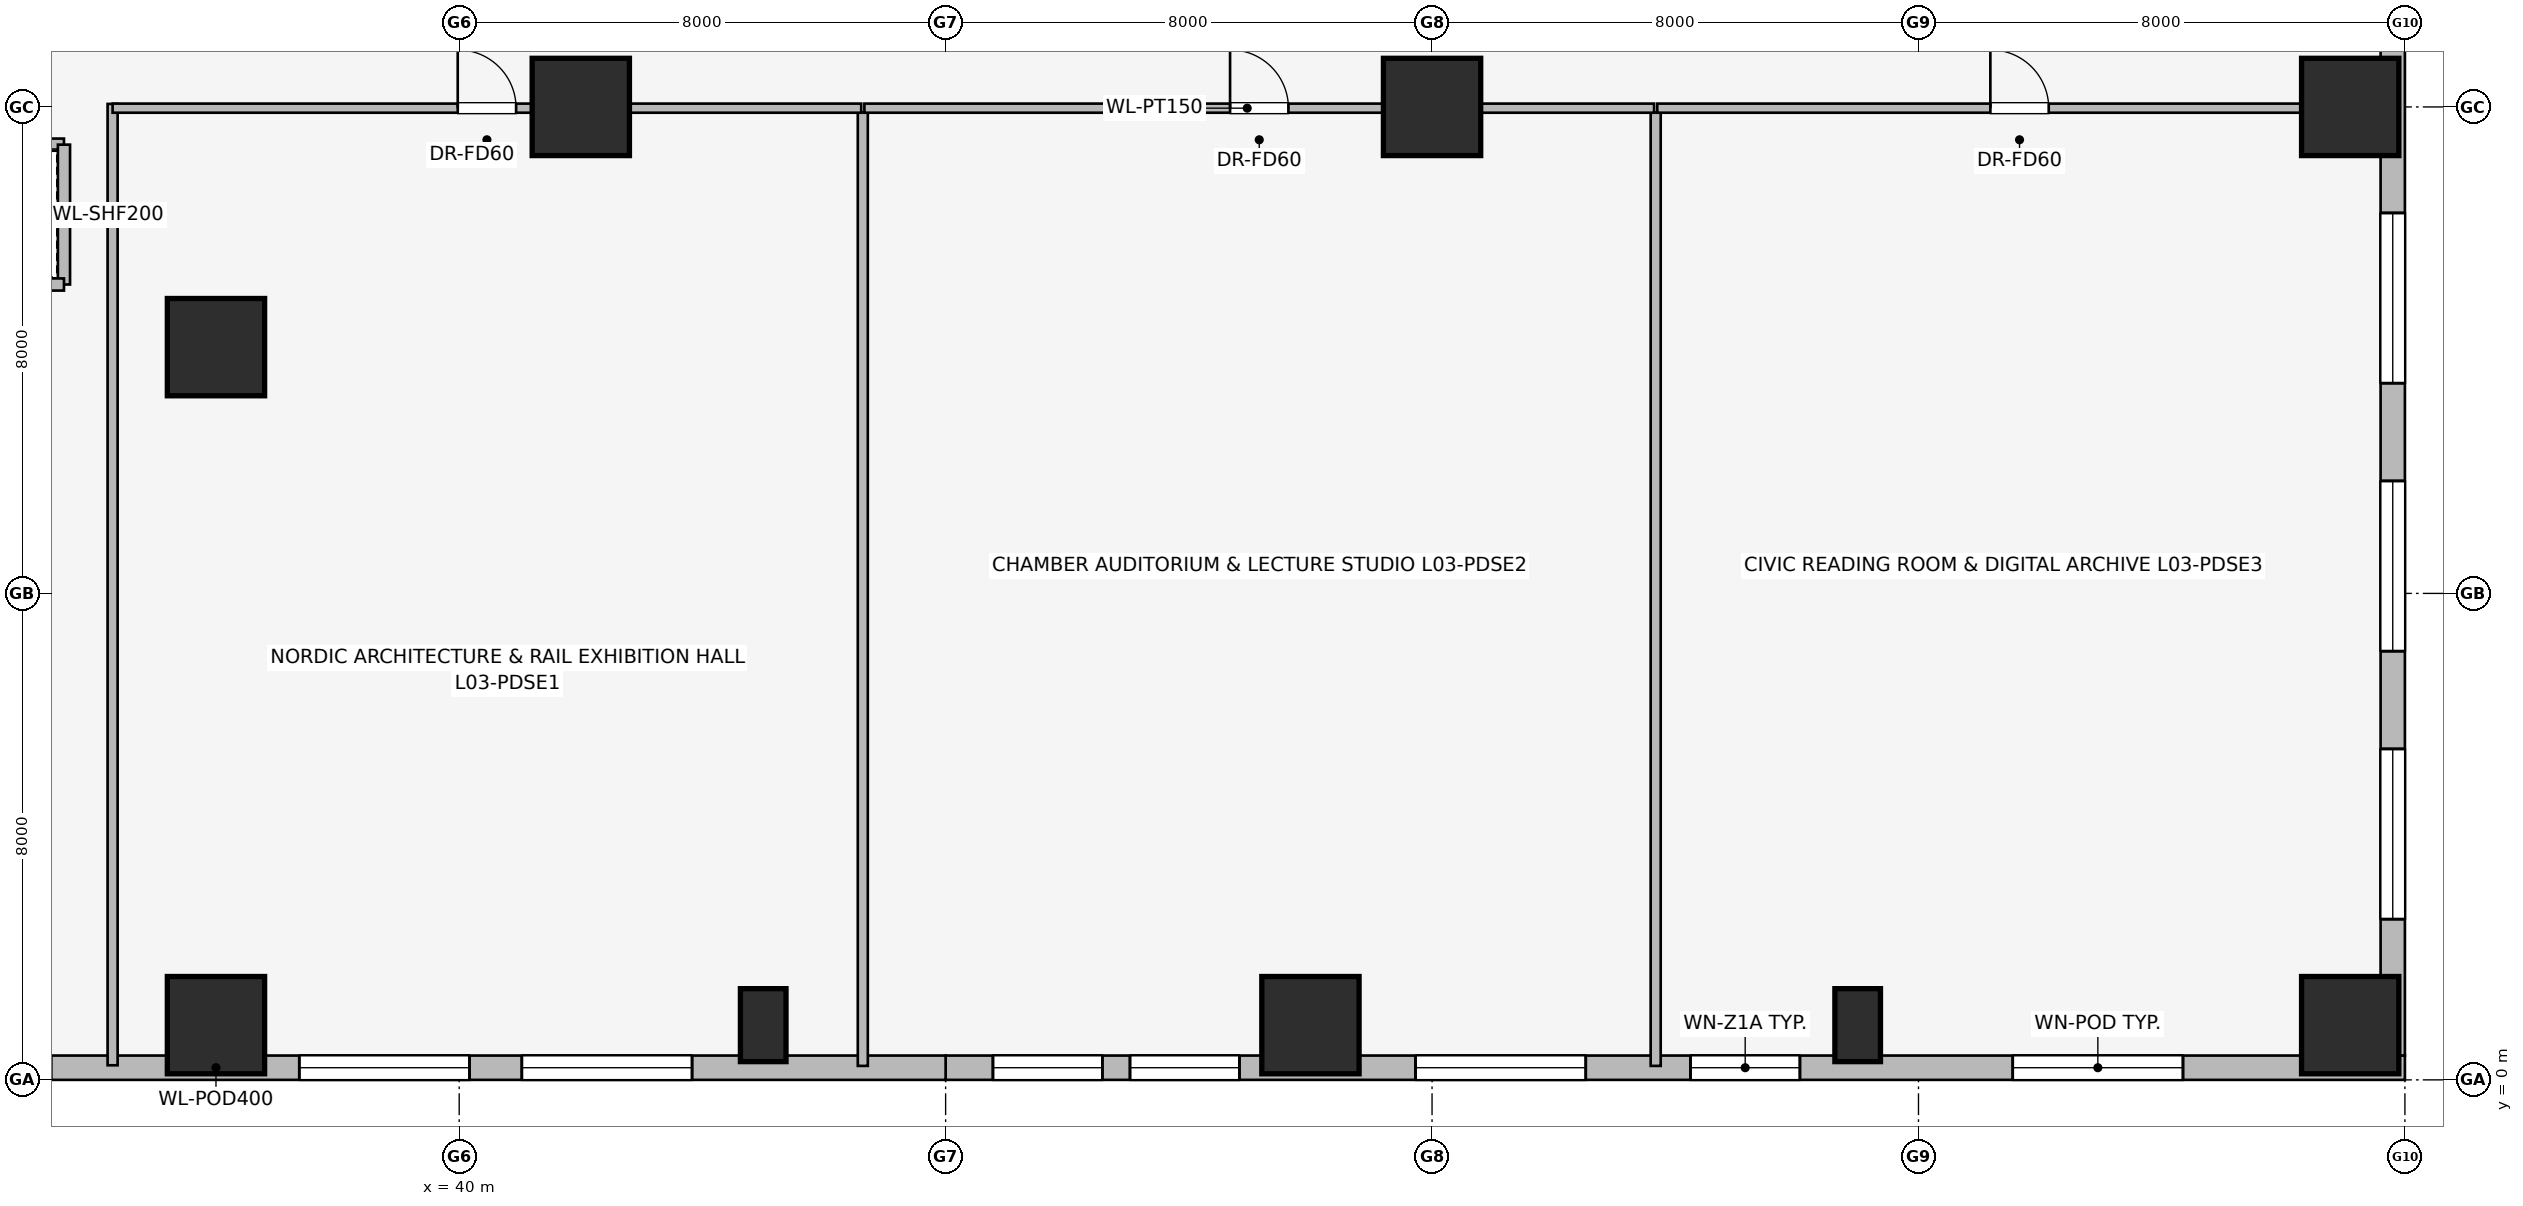
"""IFC4 building model, lengths in metres.
Left out: names, types, materials, properties, quantities, classifications, styles, units other than length and angle.
Written with IfcOpenShell. Run it as: python <this file> out.ifc"""

import sys

from ifc_helpers import new_model, si_unit, direction, frame, frame_2d, origin, origin_2d, place, context, subcontext, project, spatial, rectangle, extrude, element, fill, save


model = new_model("IFC4")
c1 = context("Model", 3, precision=1e-05, world=origin(), true_north=direction((0.0, 1.0)))
c2 = subcontext(c1, "Body", "Model", "MODEL_VIEW")
j1 = project(units=[si_unit("LENGTHUNIT", "METRE"), si_unit("PLANEANGLEUNIT", "RADIAN")], contexts=[c1])
p1 = place(None, origin())
s1 = spatial("IfcSite", under=j1, at=p1, CompositionType="ELEMENT")
p2 = place(p1, origin())
s2 = spatial("IfcBuilding", under=s1, at=p2, CompositionType="ELEMENT")
p3 = place(p2, frame((0.0, 0.0, 11.0)))
s3 = spatial("IfcBuildingStorey", under=s2, at=p3, CompositionType="ELEMENT", Elevation=11.0)
for number, where, z_axis, x_axis in (
    (1, (71.1, 0.9, 0.0), (0.0, 0.0, 1.0), (1.0, 0.0, 0.0)),
    (2, (36.0, 0.9, 0.0), (0.0, 0.0, 1.0), (1.0, 0.0, 0.0)),
    (3, (54.0, 0.9, 0.0), (0.0, 0.0, 1.0), (1.0, 0.0, 0.0)),
    (4, (71.1, 16.0, 0.0), (0.0, 0.0, 1.0), (1.0, 0.0, 0.0)),
    (5, (42.0, 16.0, 0.0), (0.0, 0.0, 1.0), (1.0, 0.0, 0.0)),
    (6, (56.0, 16.0, 0.0), (0.0, 0.0, 1.0), (1.0, 0.0, 0.0)),
    (7, (36.0, 12.05, 0.0), (0.0, 0.0, 1.0), (1.0, 0.0, 0.0)),
):
    element("IfcColumn", number, at=place(p3, frame(where, z_axis=z_axis, x_axis=x_axis)), inside=s3, PredefinedType="COLUMN", context=c2, shape_type="SweptSolid", body=[
        extrude(rectangle(XDim=1.6, YDim=1.6, at=origin_2d()), origin(), (0.0, 0.0, 1.0), 5.0),
    ])
for number, where, z_axis, x_axis in (
    (8, (45.0, 0.9, 0.0), (0.0, 0.0, 1.0), (1.0, 0.0, 0.0)),
    (9, (63.0, 0.9, 0.0), (0.0, 0.0, 1.0), (1.0, 0.0, 0.0)),
):
    element("IfcColumn", number, at=place(p3, frame(where, z_axis=z_axis, x_axis=x_axis)), inside=s3, PredefinedType="PILASTER", context=c2, shape_type="SweptSolid", body=[
        extrude(rectangle(XDim=0.75, YDim=1.2, at=origin_2d()), origin(), (0.0, 0.0, 1.0), 5.0),
    ])
p4 = place(p3, frame((72.0, 0.2, 0.0), z_axis=(0.0, 0.0, 1.0), x_axis=(-1.0, 0.0, 0.0)))
e10 = element("IfcWall", 10, at=p4, inside=s3, PredefinedType="STANDARD", context=c2, shape_type="SweptSolid", body=[
    extrude(rectangle(XDim=24.0, YDim=0.4, at=frame_2d((12.0, 0.0))), origin(), (0.0, 0.0, 1.0), 4.69),
])
p5 = place(p4, frame((3.65, 0.0, 0.75)))
e11 = element("IfcOpeningElement", 11, at=p5, cuts=e10, PredefinedType="OPENING", context=c2, shape_type="SweptSolid", body=[
    extrude(rectangle(XDim=2.8, YDim=1.8, at=frame_2d((1.4, 0.9))), frame((0.0, 0.21, 0.0), z_axis=(0.0, -1.0, 0.0), x_axis=(1.0, 0.0, 0.0)), (0.0, 0.0, 1.0), 0.42),
])
p6 = place(p4, frame((9.95, 0.0, 0.75)))
e12 = element("IfcOpeningElement", 12, at=p6, cuts=e10, PredefinedType="OPENING", context=c2, shape_type="SweptSolid", body=[
    extrude(rectangle(XDim=1.8, YDim=1.5, at=frame_2d((0.9, 0.75))), frame((0.0, 0.21, 0.0), z_axis=(0.0, -1.0, 0.0), x_axis=(1.0, 0.0, 0.0)), (0.0, 0.0, 1.0), 0.42),
])
p7 = place(p4, frame((13.472, 0.0, 0.75)))
e13 = element("IfcOpeningElement", 13, at=p7, cuts=e10, PredefinedType="OPENING", context=c2, shape_type="SweptSolid", body=[
    extrude(rectangle(XDim=2.8, YDim=1.8, at=frame_2d((1.4, 0.9))), frame((0.0, 0.21, 0.0), z_axis=(0.0, -1.0, 0.0), x_axis=(1.0, 0.0, 0.0)), (0.0, 0.0, 1.0), 0.42),
])
p8 = place(p4, frame((19.168, 0.0, 0.75)))
e14 = element("IfcOpeningElement", 14, at=p8, cuts=e10, PredefinedType="OPENING", context=c2, shape_type="SweptSolid", body=[
    extrude(rectangle(XDim=1.8, YDim=1.5, at=frame_2d((0.9, 0.75))), frame((0.0, 0.21, 0.0), z_axis=(0.0, -1.0, 0.0), x_axis=(1.0, 0.0, 0.0)), (0.0, 0.0, 1.0), 0.42),
])
p9 = place(p4, frame((21.422, 0.0, 0.75)))
e15 = element("IfcOpeningElement", 15, at=p9, cuts=e10, PredefinedType="OPENING", context=c2, shape_type="SweptSolid", body=[
    extrude(rectangle(XDim=1.8, YDim=1.5, at=frame_2d((0.9, 0.75))), frame((0.0, 0.21, 0.0), z_axis=(0.0, -1.0, 0.0), x_axis=(1.0, 0.0, 0.0)), (0.0, 0.0, 1.0), 0.42),
])
p10 = place(p3, frame((48.0, 0.2, 0.0), z_axis=(0.0, 0.0, 1.0), x_axis=(-1.0, 0.0, 0.0)))
e16 = element("IfcWall", 16, at=p10, inside=s3, PredefinedType="STANDARD", context=c2, shape_type="SweptSolid", body=[
    extrude(rectangle(XDim=24.0, YDim=0.4, at=frame_2d((12.0, 0.0))), origin(), (0.0, 0.0, 1.0), 4.69),
])
p11 = place(p10, frame((4.17, 0.0, 0.75)))
e17 = element("IfcOpeningElement", 17, at=p11, cuts=e16, PredefinedType="OPENING", context=c2, shape_type="SweptSolid", body=[
    extrude(rectangle(XDim=2.8, YDim=1.8, at=frame_2d((1.4, 0.9))), frame((0.0, 0.21, 0.0), z_axis=(0.0, -1.0, 0.0), x_axis=(1.0, 0.0, 0.0)), (0.0, 0.0, 1.0), 0.42),
])
p12 = place(p10, frame((7.83, 0.0, 0.75)))
e18 = element("IfcOpeningElement", 18, at=p12, cuts=e16, PredefinedType="OPENING", context=c2, shape_type="SweptSolid", body=[
    extrude(rectangle(XDim=2.8, YDim=1.8, at=frame_2d((1.4, 0.9))), frame((0.0, 0.21, 0.0), z_axis=(0.0, -1.0, 0.0), x_axis=(1.0, 0.0, 0.0)), (0.0, 0.0, 1.0), 0.42),
])
p13 = place(p10, frame((14.712, 0.0, 0.75)))
e19 = element("IfcOpeningElement", 19, at=p13, cuts=e16, PredefinedType="OPENING", context=c2, shape_type="SweptSolid", body=[
    extrude(rectangle(XDim=1.8, YDim=1.5, at=frame_2d((0.9, 0.75))), frame((0.0, 0.21, 0.0), z_axis=(0.0, -1.0, 0.0), x_axis=(1.0, 0.0, 0.0)), (0.0, 0.0, 1.0), 0.42),
])
p14 = place(p10, frame((17.811, 0.0, 0.75)))
e20 = element("IfcOpeningElement", 20, at=p14, cuts=e16, PredefinedType="OPENING", context=c2, shape_type="SweptSolid", body=[
    extrude(rectangle(XDim=1.8, YDim=1.5, at=frame_2d((0.9, 0.75))), frame((0.0, 0.21, 0.0), z_axis=(0.0, -1.0, 0.0), x_axis=(1.0, 0.0, 0.0)), (0.0, 0.0, 1.0), 0.42),
])
p15 = place(p10, frame((22.07, 0.0, 0.75)))
e21 = element("IfcOpeningElement", 21, at=p15, cuts=e16, PredefinedType="OPENING", context=c2, shape_type="SweptSolid", body=[
    extrude(rectangle(XDim=1.05, YDim=1.4, at=frame_2d((0.525, 0.7))), frame((0.0, 0.21, 0.0), z_axis=(0.0, -1.0, 0.0), x_axis=(1.0, 0.0, 0.0)), (0.0, 0.0, 1.0), 0.42),
])
p16 = place(p3, frame((71.8, 17.0, 0.0), z_axis=(0.0, 0.0, 1.0), x_axis=(0.0, -1.0, 0.0)))
e22 = element("IfcWall", 22, at=p16, inside=s3, PredefinedType="STANDARD", context=c2, shape_type="SweptSolid", body=[
    extrude(rectangle(XDim=16.6, YDim=0.4, at=frame_2d((8.3, 0.0))), origin(), (0.0, 0.0, 1.0), 4.69),
])
p17 = place(p16, frame((2.743, 0.0, 0.75)))
e23 = element("IfcOpeningElement", 23, at=p17, cuts=e22, PredefinedType="OPENING", context=c2, shape_type="SweptSolid", body=[
    extrude(rectangle(XDim=2.8, YDim=1.8, at=frame_2d((1.4, 0.9))), frame((0.0, 0.21, 0.0), z_axis=(0.0, -1.0, 0.0), x_axis=(1.0, 0.0, 0.0)), (0.0, 0.0, 1.0), 0.42),
])
p18 = place(p16, frame((7.15, 0.0, 0.75)))
e24 = element("IfcOpeningElement", 24, at=p18, cuts=e22, PredefinedType="OPENING", context=c2, shape_type="SweptSolid", body=[
    extrude(rectangle(XDim=2.8, YDim=1.8, at=frame_2d((1.4, 0.9))), frame((0.0, 0.21, 0.0), z_axis=(0.0, -1.0, 0.0), x_axis=(1.0, 0.0, 0.0)), (0.0, 0.0, 1.0), 0.42),
])
p19 = place(p16, frame((11.557, 0.0, 0.75)))
e25 = element("IfcOpeningElement", 25, at=p19, cuts=e22, PredefinedType="OPENING", context=c2, shape_type="SweptSolid", body=[
    extrude(rectangle(XDim=2.8, YDim=1.8, at=frame_2d((1.4, 0.9))), frame((0.0, 0.21, 0.0), z_axis=(0.0, -1.0, 0.0), x_axis=(1.0, 0.0, 0.0)), (0.0, 0.0, 1.0), 0.42),
])
p20 = place(p3, frame((33.5, 15.38, 0.0), z_axis=(0.0, 0.0, 1.0), x_axis=(-1.0, 0.0, 0.0)))
e26 = element("IfcWall", 26, at=p20, inside=s3, PredefinedType="PARTITIONING", context=c2, shape_type="SweptSolid", body=[
    extrude(rectangle(XDim=2.82, YDim=0.2, at=frame_2d((1.41, 0.0))), origin(), (0.0, 0.0, 1.0), 4.69),
])
p21 = place(p20, frame((0.8, 0.0, 0.0)))
e27 = element("IfcOpeningElement", 27, at=p21, cuts=e26, PredefinedType="OPENING", context=c2, shape_type="SweptSolid", body=[
    extrude(rectangle(XDim=1.2, YDim=2.2, at=frame_2d((0.6, 1.1))), frame((0.0, 0.11, 0.0), z_axis=(0.0, -1.0, 0.0), x_axis=(1.0, 0.0, 0.0)), (0.0, 0.0, 1.0), 0.22),
])
p22 = place(p3, frame((33.5, 13.08, 0.0), z_axis=(0.0, 0.0, 1.0), x_axis=(0.0, 1.0, 0.0)))
e28 = element("IfcWall", 28, at=p22, inside=s3, PredefinedType="PARTITIONING", context=c2, shape_type="SweptSolid", body=[
    extrude(rectangle(XDim=2.3, YDim=0.2, at=frame_2d((1.15, 0.0))), origin(), (0.0, 0.0, 1.0), 4.69),
])
p23 = place(p3, frame((30.879, 13.08, 0.0), z_axis=(0.0, 0.0, 1.0), x_axis=(1.0, 0.0, 0.0)))
e29 = element("IfcWall", 29, at=p23, inside=s3, PredefinedType="PARTITIONING", context=c2, shape_type="SweptSolid", body=[
    extrude(rectangle(XDim=2.621, YDim=0.2, at=frame_2d((1.311, 0.0))), origin(), (0.0, 0.0, 1.0), 4.69),
])
p24 = place(p3, frame((34.3, 0.24, 0.0), z_axis=(0.0, 0.0, 1.0), x_axis=(0.0, 1.0, 0.0)))
e30 = element("IfcWall", 30, at=p24, inside=s3, PredefinedType="PARTITIONING", context=c2, shape_type="SweptSolid", body=[
    extrude(rectangle(XDim=15.81, YDim=0.165, at=frame_2d((7.905, 0.0))), origin(), (0.0, 0.0, 1.0), 4.69),
])
p25 = place(p3, frame((46.638, 0.23, 0.0), z_axis=(0.0, 0.0, 1.0), x_axis=(0.0, 1.0, 0.0)))
e31 = element("IfcWall", 31, at=p25, inside=s3, PredefinedType="PARTITIONING", context=c2, shape_type="SweptSolid", body=[
    extrude(rectangle(XDim=15.68, YDim=0.165, at=frame_2d((7.84, 0.0))), origin(), (0.0, 0.0, 1.0), 4.082),
])
p26 = place(p3, frame((59.678, 0.23, 0.0), z_axis=(0.0, 0.0, 1.0), x_axis=(0.0, 1.0, 0.0)))
e32 = element("IfcWall", 32, at=p26, inside=s3, PredefinedType="PARTITIONING", context=c2, shape_type="SweptSolid", body=[
    extrude(rectangle(XDim=15.68, YDim=0.165, at=frame_2d((7.84, 0.0))), origin(), (0.0, 0.0, 1.0), 4.69),
])
p27 = place(p3, frame((34.3, 15.98, 0.0), z_axis=(0.0, 0.0, 1.0), x_axis=(1.0, 0.0, 0.0)))
e33 = element("IfcWall", 33, at=p27, inside=s3, PredefinedType="PARTITIONING", context=c2, shape_type="SweptSolid", body=[
    extrude(rectangle(XDim=12.312, YDim=0.15, at=frame_2d((6.156, 0.0))), origin(), (0.0, 0.0, 1.0), 3.742),
])
p28 = place(p27, frame((5.676, 0.0, 0.0)))
e34 = element("IfcOpeningElement", 34, at=p28, cuts=e33, PredefinedType="OPENING", context=c2, shape_type="SweptSolid", body=[
    extrude(rectangle(XDim=0.96, YDim=2.0, at=frame_2d((0.48, 1.0))), frame((0.0, 0.085, 0.0), z_axis=(0.0, -1.0, 0.0), x_axis=(1.0, 0.0, 0.0)), (0.0, 0.0, 1.0), 0.17),
])
p29 = place(p3, frame((46.664, 15.98, 0.0), z_axis=(0.0, 0.0, 1.0), x_axis=(1.0, 0.0, 0.0)))
e35 = element("IfcWall", 35, at=p29, inside=s3, PredefinedType="PARTITIONING", context=c2, shape_type="SweptSolid", body=[
    extrude(rectangle(XDim=12.988, YDim=0.15, at=frame_2d((6.494, 0.0))), origin(), (0.0, 0.0, 1.0), 3.742),
])
p30 = place(p29, frame((6.014, 0.0, 0.0)))
e36 = element("IfcOpeningElement", 36, at=p30, cuts=e35, PredefinedType="OPENING", context=c2, shape_type="SweptSolid", body=[
    extrude(rectangle(XDim=0.96, YDim=2.0, at=frame_2d((0.48, 1.0))), frame((0.0, 0.085, 0.0), z_axis=(0.0, -1.0, 0.0), x_axis=(1.0, 0.0, 0.0)), (0.0, 0.0, 1.0), 0.17),
])
p31 = place(p3, frame((59.704, 15.98, 0.0), z_axis=(0.0, 0.0, 1.0), x_axis=(1.0, 0.0, 0.0)))
e37 = element("IfcWall", 37, at=p31, inside=s3, PredefinedType="PARTITIONING", context=c2, shape_type="SweptSolid", body=[
    extrude(rectangle(XDim=11.916, YDim=0.15, at=frame_2d((5.958, 0.0))), origin(), (0.0, 0.0, 1.0), 3.742),
])
p32 = place(p31, frame((5.478, 0.0, 0.0)))
e38 = element("IfcOpeningElement", 38, at=p32, cuts=e37, PredefinedType="OPENING", context=c2, shape_type="SweptSolid", body=[
    extrude(rectangle(XDim=0.96, YDim=2.0, at=frame_2d((0.48, 1.0))), frame((0.0, 0.085, 0.0), z_axis=(0.0, -1.0, 0.0), x_axis=(1.0, 0.0, 0.0)), (0.0, 0.0, 1.0), 0.17),
])
p33 = place(p5, origin())
e39 = element("IfcWindow", 39, at=p33, inside=s3, PartitioningType="SINGLE_PANEL", PredefinedType="WINDOW", context=c2, shape_type="SweptSolid", body=[
    extrude(rectangle(XDim=2.8, YDim=1.8, at=frame_2d((1.4, 0.9))), frame((0.0, 0.03, 0.0), z_axis=(0.0, -1.0, 0.0), x_axis=(1.0, 0.0, 0.0)), (0.0, 0.0, 1.0), 0.06),
])
fill(e11, e39)
p34 = place(p6, origin())
e40 = element("IfcWindow", 40, at=p34, inside=s3, PartitioningType="SINGLE_PANEL", PredefinedType="WINDOW", context=c2, shape_type="SweptSolid", body=[
    extrude(rectangle(XDim=1.8, YDim=1.5, at=frame_2d((0.9, 0.75))), frame((0.0, 0.03, 0.0), z_axis=(0.0, -1.0, 0.0), x_axis=(1.0, 0.0, 0.0)), (0.0, 0.0, 1.0), 0.06),
])
fill(e12, e40)
p35 = place(p7, origin())
e41 = element("IfcWindow", 41, at=p35, inside=s3, PartitioningType="SINGLE_PANEL", PredefinedType="WINDOW", context=c2, shape_type="SweptSolid", body=[
    extrude(rectangle(XDim=2.8, YDim=1.8, at=frame_2d((1.4, 0.9))), frame((0.0, 0.03, 0.0), z_axis=(0.0, -1.0, 0.0), x_axis=(1.0, 0.0, 0.0)), (0.0, 0.0, 1.0), 0.06),
])
fill(e13, e41)
p36 = place(p8, origin())
e42 = element("IfcWindow", 42, at=p36, inside=s3, PartitioningType="SINGLE_PANEL", PredefinedType="WINDOW", context=c2, shape_type="SweptSolid", body=[
    extrude(rectangle(XDim=1.8, YDim=1.5, at=frame_2d((0.9, 0.75))), frame((0.0, 0.03, 0.0), z_axis=(0.0, -1.0, 0.0), x_axis=(1.0, 0.0, 0.0)), (0.0, 0.0, 1.0), 0.06),
])
fill(e14, e42)
p37 = place(p9, origin())
e43 = element("IfcWindow", 43, at=p37, inside=s3, PartitioningType="SINGLE_PANEL", PredefinedType="WINDOW", context=c2, shape_type="SweptSolid", body=[
    extrude(rectangle(XDim=1.8, YDim=1.5, at=frame_2d((0.9, 0.75))), frame((0.0, 0.03, 0.0), z_axis=(0.0, -1.0, 0.0), x_axis=(1.0, 0.0, 0.0)), (0.0, 0.0, 1.0), 0.06),
])
fill(e15, e43)
p38 = place(p11, origin())
e44 = element("IfcWindow", 44, at=p38, inside=s3, PartitioningType="SINGLE_PANEL", PredefinedType="WINDOW", context=c2, shape_type="SweptSolid", body=[
    extrude(rectangle(XDim=2.8, YDim=1.8, at=frame_2d((1.4, 0.9))), frame((0.0, 0.03, 0.0), z_axis=(0.0, -1.0, 0.0), x_axis=(1.0, 0.0, 0.0)), (0.0, 0.0, 1.0), 0.06),
])
fill(e17, e44)
p39 = place(p12, origin())
e45 = element("IfcWindow", 45, at=p39, inside=s3, PartitioningType="SINGLE_PANEL", PredefinedType="WINDOW", context=c2, shape_type="SweptSolid", body=[
    extrude(rectangle(XDim=2.8, YDim=1.8, at=frame_2d((1.4, 0.9))), frame((0.0, 0.03, 0.0), z_axis=(0.0, -1.0, 0.0), x_axis=(1.0, 0.0, 0.0)), (0.0, 0.0, 1.0), 0.06),
])
fill(e18, e45)
p40 = place(p17, origin())
e46 = element("IfcWindow", 46, at=p40, inside=s3, PartitioningType="SINGLE_PANEL", PredefinedType="WINDOW", context=c2, shape_type="SweptSolid", body=[
    extrude(rectangle(XDim=2.8, YDim=1.8, at=frame_2d((1.4, 0.9))), frame((0.0, 0.03, 0.0), z_axis=(0.0, -1.0, 0.0), x_axis=(1.0, 0.0, 0.0)), (0.0, 0.0, 1.0), 0.06),
])
fill(e23, e46)
p41 = place(p18, origin())
e47 = element("IfcWindow", 47, at=p41, inside=s3, PartitioningType="SINGLE_PANEL", PredefinedType="WINDOW", context=c2, shape_type="SweptSolid", body=[
    extrude(rectangle(XDim=2.8, YDim=1.8, at=frame_2d((1.4, 0.9))), frame((0.0, 0.03, 0.0), z_axis=(0.0, -1.0, 0.0), x_axis=(1.0, 0.0, 0.0)), (0.0, 0.0, 1.0), 0.06),
])
fill(e24, e47)
p42 = place(p19, origin())
e48 = element("IfcWindow", 48, at=p42, inside=s3, PartitioningType="SINGLE_PANEL", PredefinedType="WINDOW", context=c2, shape_type="SweptSolid", body=[
    extrude(rectangle(XDim=2.8, YDim=1.8, at=frame_2d((1.4, 0.9))), frame((0.0, 0.03, 0.0), z_axis=(0.0, -1.0, 0.0), x_axis=(1.0, 0.0, 0.0)), (0.0, 0.0, 1.0), 0.06),
])
fill(e25, e48)
p43 = place(p28, origin())
e49 = element("IfcDoor", 49, at=p43, inside=s3, OperationType="SINGLE_SWING_LEFT", PredefinedType="DOOR", context=c2, shape_type="SweptSolid", body=[
    extrude(rectangle(XDim=0.96, YDim=2.0, at=frame_2d((0.48, 1.0))), frame((0.0, 0.025, 0.0), z_axis=(0.0, -1.0, 0.0), x_axis=(1.0, 0.0, 0.0)), (0.0, 0.0, 1.0), 0.05),
])
fill(e34, e49)
p44 = place(p30, origin())
e50 = element("IfcDoor", 50, at=p44, inside=s3, OperationType="SINGLE_SWING_LEFT", PredefinedType="DOOR", context=c2, shape_type="SweptSolid", body=[
    extrude(rectangle(XDim=0.96, YDim=2.0, at=frame_2d((0.48, 1.0))), frame((0.0, 0.025, 0.0), z_axis=(0.0, -1.0, 0.0), x_axis=(1.0, 0.0, 0.0)), (0.0, 0.0, 1.0), 0.05),
])
fill(e36, e50)
p45 = place(p32, origin())
e51 = element("IfcDoor", 51, at=p45, inside=s3, OperationType="SINGLE_SWING_LEFT", PredefinedType="DOOR", context=c2, shape_type="SweptSolid", body=[
    extrude(rectangle(XDim=0.96, YDim=2.0, at=frame_2d((0.48, 1.0))), frame((0.0, 0.025, 0.0), z_axis=(0.0, -1.0, 0.0), x_axis=(1.0, 0.0, 0.0)), (0.0, 0.0, 1.0), 0.05),
])
fill(e38, e51)
save(model, sys.argv[1])
